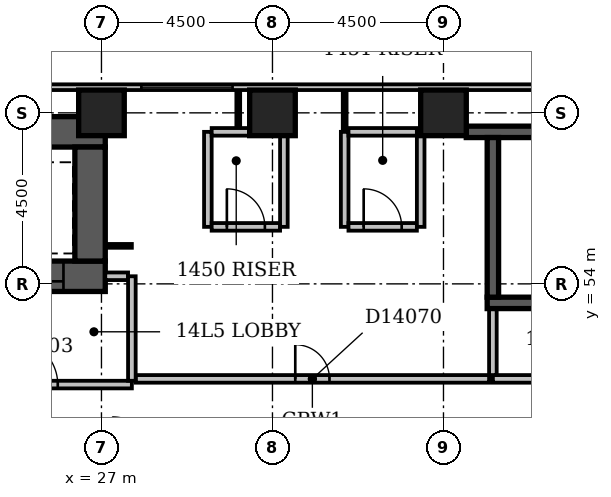
"""IFC4 building model, lengths in metres.
Left out: names, types, materials, properties, quantities, classifications, styles, units other than length and angle.
Written with IfcOpenShell. Run it as: python <this file> out.ifc"""

import sys

from ifc_helpers import new_model, si_unit, direction, frame, frame_2d, origin, origin_2d, place, context, subcontext, project, spatial, rectangle, extrude, element, fill, save


model = new_model("IFC4")
c1 = context("Model", 3, precision=1e-05, world=origin(), true_north=direction((0.0, 1.0)))
c2 = subcontext(c1, "Body", "Model", "MODEL_VIEW")
j1 = project(units=[si_unit("LENGTHUNIT", "METRE"), si_unit("PLANEANGLEUNIT", "RADIAN")], contexts=[c1])
p1 = place(None, origin())
s1 = spatial("IfcSite", under=j1, at=p1, CompositionType="ELEMENT")
p2 = place(p1, origin())
s2 = spatial("IfcBuilding", under=s1, at=p2, CompositionType="ELEMENT")
p3 = place(p2, frame((0.0, 0.0, 61.4)))
s3 = spatial("IfcBuildingStorey", under=s2, at=p3, CompositionType="ELEMENT", Elevation=61.4)
p4 = place(p3, frame((23.8, 54.2, -0.3), z_axis=(0.0, 0.0, 1.0), x_axis=(1.0, 0.0, 0.0)))
e1 = element("IfcWall", 1, at=p4, inside=s3, PredefinedType="SHEAR", context=c2, shape_type="SweptSolid", body=[
    extrude(rectangle(XDim=3.3, YDim=0.8, at=frame_2d((1.65, 0.0))), origin(), (0.0, 0.0, 1.0), 3.6),
])
p5 = place(p4, frame((1.1, 0.0, 0.3)))
e2 = element("IfcOpeningElement", 2, at=p5, cuts=e1, PredefinedType="OPENING", context=c2, shape_type="SweptSolid", body=[
    extrude(rectangle(XDim=1.1, YDim=2.1, at=frame_2d((0.55, 1.05))), frame((0.0, 0.412, 0.0), z_axis=(0.0, -1.0, 0.0), x_axis=(1.0, 0.0, 0.0)), (0.0, 0.0, 1.0), 0.824),
])
p6 = place(p3, frame((23.8, 58.0, -0.3), z_axis=(0.0, 0.0, 1.0), x_axis=(1.0, 0.0, 0.0)))
e3 = element("IfcWall", 3, at=p6, inside=s3, PredefinedType="SHEAR", context=c2, shape_type="SweptSolid", body=[
    extrude(rectangle(XDim=3.3, YDim=0.8, at=frame_2d((1.65, 0.0))), origin(), (0.0, 0.0, 1.0), 3.6),
])
p7 = place(p3, frame((26.7, 54.6, -0.3), z_axis=(0.0, 0.0, 1.0), x_axis=(0.0, 1.0, 0.0)))
e4 = element("IfcWall", 4, at=p7, inside=s3, PredefinedType="SHEAR", context=c2, shape_type="SweptSolid", body=[
    extrude(rectangle(XDim=3.0, YDim=0.8, at=frame_2d((1.5, 0.0))), origin(), (0.0, 0.0, 1.0), 3.6),
])
p8 = place(p3, frame((36.6, 58.0, -0.3), z_axis=(0.0, 0.0, 1.0), x_axis=(1.0, 0.0, 0.0)))
e5 = element("IfcWall", 5, at=p8, inside=s3, PredefinedType="SHEAR", context=c2, shape_type="SweptSolid", body=[
    extrude(rectangle(XDim=7.8, YDim=0.3, at=frame_2d((3.9, 0.0))), origin(), (0.0, 0.0, 1.0), 3.6),
])
p9 = place(p3, frame((37.15, 53.5, -0.3), z_axis=(0.0, 0.0, 1.0), x_axis=(1.0, 0.0, 0.0)))
e6 = element("IfcWall", 6, at=p9, inside=s3, PredefinedType="SHEAR", context=c2, shape_type="SweptSolid", body=[
    extrude(rectangle(XDim=7.0, YDim=0.3, at=frame_2d((3.5, 0.0))), origin(), (0.0, 0.0, 1.0), 3.6),
])
p10 = place(p9, frame((5.58, 0.0, 0.3)))
e7 = element("IfcOpeningElement", 7, at=p10, cuts=e6, PredefinedType="OPENING", context=c2, shape_type="SweptSolid", body=[
    extrude(rectangle(XDim=1.1, YDim=2.1, at=frame_2d((0.55, 1.05))), frame((0.0, 0.162, 0.0), z_axis=(0.0, -1.0, 0.0), x_axis=(1.0, 0.0, 0.0)), (0.0, 0.0, 1.0), 0.324),
])
p11 = place(p3, frame((37.3, 53.65, -0.3), z_axis=(0.0, 0.0, 1.0), x_axis=(0.0, 1.0, 0.0)))
e8 = element("IfcWall", 8, at=p11, inside=s3, PredefinedType="SHEAR", context=c2, shape_type="SweptSolid", body=[
    extrude(rectangle(XDim=4.2, YDim=0.3, at=frame_2d((2.1, 0.0))), origin(), (0.0, 0.0, 1.0), 3.6),
])
for number, where, z_axis, x_axis in (
    (9, (27.0, 58.5, -0.3), (0.0, 0.0, 1.0), (1.0, 0.0, 0.0)),
    (10, (31.5, 58.5, -0.3), (0.0, 0.0, 1.0), (1.0, 0.0, 0.0)),
    (11, (36.0, 58.5, -0.3), (0.0, 0.0, 1.0), (1.0, 0.0, 0.0)),
):
    element("IfcColumn", number, at=place(p3, frame(where, z_axis=z_axis, x_axis=x_axis)), inside=s3, PredefinedType="COLUMN", context=c2, shape_type="SweptSolid", body=[
        extrude(rectangle(XDim=1.2, YDim=1.2, at=origin_2d()), origin(), (0.0, 0.0, 1.0), 3.6),
    ])
p12 = place(p3, frame((68.1, 59.175, 0.0), z_axis=(0.0, 0.0, 1.0), x_axis=(-1.0, 0.0, 0.0)))
e12 = element("IfcWall", 12, at=p12, inside=s3, PredefinedType="STANDARD", context=c2, shape_type="SweptSolid", body=[
    extrude(rectangle(XDim=68.85, YDim=0.15, at=frame_2d((34.425, 0.0))), origin(), (0.0, 0.0, 1.0), 2.7),
])
p13 = place(p12, frame((37.65, 0.0, 0.6)))
e13 = element("IfcOpeningElement", 13, at=p13, cuts=e12, PredefinedType="OPENING", context=c2, shape_type="SweptSolid", body=[
    extrude(rectangle(XDim=2.4, YDim=1.8, at=frame_2d((1.2, 0.9))), frame((0.0, 0.087, 0.0), z_axis=(0.0, -1.0, 0.0), x_axis=(1.0, 0.0, 0.0)), (0.0, 0.0, 1.0), 0.174),
])
p14 = place(p3, frame((23.0, 51.35, 0.0), z_axis=(0.0, 0.0, 1.0), x_axis=(1.0, 0.0, 0.0)))
e14 = element("IfcWall", 14, at=p14, inside=s3, PredefinedType="PARTITIONING", context=c2, shape_type="SweptSolid", body=[
    extrude(rectangle(XDim=4.8, YDim=0.2, at=frame_2d((2.4, 0.0))), origin(), (0.0, 0.0, 1.0), 3.3),
])
p15 = place(p14, frame((1.65, 0.0, 0.0)))
e15 = element("IfcOpeningElement", 15, at=p15, cuts=e14, PredefinedType="OPENING", context=c2, shape_type="SweptSolid", body=[
    extrude(rectangle(XDim=1.2, YDim=2.1, at=frame_2d((0.6, 1.05))), frame((0.0, 0.112, 0.0), z_axis=(0.0, -1.0, 0.0), x_axis=(1.0, 0.0, 0.0)), (0.0, 0.0, 1.0), 0.224),
])
p16 = place(p3, frame((27.8, 51.45, 0.0), z_axis=(0.0, 0.0, 1.0), x_axis=(0.0, 1.0, 0.0)))
e16 = element("IfcWall", 16, at=p16, inside=s3, PredefinedType="PARTITIONING", context=c2, shape_type="SweptSolid", body=[
    extrude(rectangle(XDim=2.75, YDim=0.2, at=frame_2d((1.375, 0.0))), origin(), (0.0, 0.0, 1.0), 3.3),
])
p17 = place(p3, frame((27.1, 54.2, 0.0), z_axis=(0.0, 0.0, 1.0), x_axis=(1.0, 0.0, 0.0)))
e17 = element("IfcWall", 17, at=p17, inside=s3, PredefinedType="PARTITIONING", context=c2, shape_type="SweptSolid", body=[
    extrude(rectangle(XDim=0.6, YDim=0.2, at=frame_2d((0.3, 0.0))), origin(), (0.0, 0.0, 1.0), 3.3),
])
p18 = place(p3, frame((37.3, 51.5, 0.0), z_axis=(0.0, 0.0, 1.0), x_axis=(1.0, 0.0, 0.0)))
e18 = element("IfcWall", 18, at=p18, inside=s3, PredefinedType="PARTITIONING", context=c2, shape_type="SweptSolid", body=[
    extrude(rectangle(XDim=6.7, YDim=0.2, at=frame_2d((3.35, 0.0))), origin(), (0.0, 0.0, 1.0), 3.3),
])
p19 = place(p18, frame((2.75, 0.0, 0.0)))
e19 = element("IfcOpeningElement", 19, at=p19, cuts=e18, PredefinedType="OPENING", context=c2, shape_type="SweptSolid", body=[
    extrude(rectangle(XDim=1.2, YDim=2.1, at=frame_2d((0.6, 1.05))), frame((0.0, 0.112, 0.0), z_axis=(0.0, -1.0, 0.0), x_axis=(1.0, 0.0, 0.0)), (0.0, 0.0, 1.0), 0.224),
])
p20 = place(p3, frame((37.3, 51.6, 0.0), z_axis=(0.0, 0.0, 1.0), x_axis=(0.0, 1.0, 0.0)))
e20 = element("IfcWall", 20, at=p20, inside=s3, PredefinedType="PARTITIONING", context=c2, shape_type="SweptSolid", body=[
    extrude(rectangle(XDim=1.73, YDim=0.2, at=frame_2d((0.865, 0.0))), origin(), (0.0, 0.0, 1.0), 3.3),
])
p21 = place(p3, frame((27.9, 51.5, 0.0), z_axis=(0.0, 0.0, 1.0), x_axis=(1.0, 0.0, 0.0)))
e21 = element("IfcWall", 21, at=p21, inside=s3, PredefinedType="PARTITIONING", context=c2, shape_type="SweptSolid", body=[
    extrude(rectangle(XDim=9.3, YDim=0.2, at=frame_2d((4.65, 0.0))), origin(), (0.0, 0.0, 1.0), 3.3),
])
p22 = place(p21, frame((4.2, 0.0, 0.0)))
e22 = element("IfcOpeningElement", 22, at=p22, cuts=e21, PredefinedType="OPENING", context=c2, shape_type="SweptSolid", body=[
    extrude(rectangle(XDim=0.9, YDim=2.1, at=frame_2d((0.45, 1.05))), frame((0.0, 0.112, 0.0), z_axis=(0.0, -1.0, 0.0), x_axis=(1.0, 0.0, 0.0)), (0.0, 0.0, 1.0), 0.224),
])
p23 = place(p3, frame((27.1, 55.0, 0.0), z_axis=(0.0, 0.0, 1.0), x_axis=(1.0, 0.0, 0.0)))
e23 = element("IfcWall", 23, at=p23, inside=s3, PredefinedType="PARTITIONING", context=c2, shape_type="SweptSolid", body=[
    extrude(rectangle(XDim=0.7, YDim=0.1, at=frame_2d((0.35, 0.0))), origin(), (0.0, 0.0, 1.0), 3.3),
])
p24 = place(p3, frame((29.8, 55.5, 0.0), z_axis=(0.0, 0.0, 1.0), x_axis=(0.0, 1.0, 0.0)))
e24 = element("IfcWall", 24, at=p24, inside=s3, PredefinedType="PARTITIONING", context=c2, shape_type="SweptSolid", body=[
    extrude(rectangle(XDim=2.5, YDim=0.2, at=frame_2d((1.25, 0.0))), origin(), (0.0, 0.0, 1.0), 3.3),
])
p25 = place(p3, frame((29.9, 55.5, 0.0), z_axis=(0.0, 0.0, 1.0), x_axis=(1.0, 0.0, 0.0)))
e25 = element("IfcWall", 25, at=p25, inside=s3, PredefinedType="PARTITIONING", context=c2, shape_type="SweptSolid", body=[
    extrude(rectangle(XDim=1.8, YDim=0.2, at=frame_2d((0.9, 0.0))), origin(), (0.0, 0.0, 1.0), 3.3),
])
p26 = place(p25, frame((0.4, 0.0, 0.0)))
e26 = element("IfcOpeningElement", 26, at=p26, cuts=e25, PredefinedType="OPENING", context=c2, shape_type="SweptSolid", body=[
    extrude(rectangle(XDim=1.0, YDim=2.1, at=frame_2d((0.5, 1.05))), frame((0.0, 0.112, 0.0), z_axis=(0.0, -1.0, 0.0), x_axis=(1.0, 0.0, 0.0)), (0.0, 0.0, 1.0), 0.224),
])
for number, where, z_axis, x_axis in (
    (27, (31.8, 55.5, 0.0), (0.0, 0.0, 1.0), (0.0, 1.0, 0.0)),
    (28, (33.4, 55.5, 0.0), (0.0, 0.0, 1.0), (0.0, 1.0, 0.0)),
):
    element("IfcWall", number, at=place(p3, frame(where, z_axis=z_axis, x_axis=x_axis)), inside=s3, PredefinedType="PARTITIONING", context=c2, shape_type="SweptSolid", body=[
        extrude(rectangle(XDim=2.5, YDim=0.2, at=frame_2d((1.25, 0.0))), origin(), (0.0, 0.0, 1.0), 3.3),
    ])
p27 = place(p3, frame((33.5, 55.5, 0.0), z_axis=(0.0, 0.0, 1.0), x_axis=(1.0, 0.0, 0.0)))
e29 = element("IfcWall", 29, at=p27, inside=s3, PredefinedType="PARTITIONING", context=c2, shape_type="SweptSolid", body=[
    extrude(rectangle(XDim=1.8, YDim=0.2, at=frame_2d((0.9, 0.0))), origin(), (0.0, 0.0, 1.0), 3.3),
])
p28 = place(p27, frame((0.4, 0.0, 0.0)))
e30 = element("IfcOpeningElement", 30, at=p28, cuts=e29, PredefinedType="OPENING", context=c2, shape_type="SweptSolid", body=[
    extrude(rectangle(XDim=1.0, YDim=2.1, at=frame_2d((0.5, 1.05))), frame((0.0, 0.112, 0.0), z_axis=(0.0, -1.0, 0.0), x_axis=(1.0, 0.0, 0.0)), (0.0, 0.0, 1.0), 0.224),
])
p29 = place(p3, frame((35.4, 55.5, 0.0), z_axis=(0.0, 0.0, 1.0), x_axis=(0.0, 1.0, 0.0)))
e31 = element("IfcWall", 31, at=p29, inside=s3, PredefinedType="PARTITIONING", context=c2, shape_type="SweptSolid", body=[
    extrude(rectangle(XDim=2.5, YDim=0.2, at=frame_2d((1.25, 0.0))), origin(), (0.0, 0.0, 1.0), 2.4),
])
p30 = place(p3, frame((29.9, 58.0, 0.0), z_axis=(0.0, 0.0, 1.0), x_axis=(1.0, 0.0, 0.0)))
e32 = element("IfcWall", 32, at=p30, inside=s3, PredefinedType="PARTITIONING", context=c2, shape_type="SweptSolid", body=[
    extrude(rectangle(XDim=1.8, YDim=0.2, at=frame_2d((0.9, 0.0))), origin(), (0.0, 0.0, 1.0), 3.3),
])
p31 = place(p3, frame((33.4, 58.0, 0.0), z_axis=(0.0, 0.0, 1.0), x_axis=(0.0, 1.0, 0.0)))
e33 = element("IfcWall", 33, at=p31, inside=s3, PredefinedType="PARTITIONING", context=c2, shape_type="SweptSolid", body=[
    extrude(rectangle(XDim=1.1, YDim=0.1, at=frame_2d((0.55, 0.0))), origin(), (0.0, 0.0, 1.0), 3.3),
])
p32 = place(p3, frame((33.5, 58.0, 0.0), z_axis=(0.0, 0.0, 1.0), x_axis=(1.0, 0.0, 0.0)))
e34 = element("IfcWall", 34, at=p32, inside=s3, PredefinedType="PARTITIONING", context=c2, shape_type="SweptSolid", body=[
    extrude(rectangle(XDim=1.8, YDim=0.2, at=frame_2d((0.9, 0.0))), origin(), (0.0, 0.0, 1.0), 3.3),
])
p33 = place(p3, frame((30.6, 58.1, 0.0), z_axis=(0.0, 0.0, 1.0), x_axis=(0.0, 1.0, 0.0)))
e35 = element("IfcWall", 35, at=p33, inside=s3, PredefinedType="PARTITIONING", context=c2, shape_type="SweptSolid", body=[
    extrude(rectangle(XDim=1.0, YDim=0.1, at=frame_2d((0.5, 0.0))), origin(), (0.0, 0.0, 1.0), 3.3),
])
p34 = place(p13, origin())
e36 = element("IfcWindow", 36, at=p34, inside=s3, PartitioningType="SINGLE_PANEL", PredefinedType="WINDOW", context=c2, shape_type="SweptSolid", body=[
    extrude(rectangle(XDim=2.4, YDim=1.8, at=frame_2d((1.2, 0.9))), frame((0.0, 0.03, 0.0), z_axis=(0.0, -1.0, 0.0), x_axis=(1.0, 0.0, 0.0)), (0.0, 0.0, 1.0), 0.06),
])
fill(e13, e36)
p35 = place(p15, origin())
e37 = element("IfcDoor", 37, at=p35, inside=s3, OperationType="SINGLE_SWING_LEFT", PredefinedType="DOOR", context=c2, shape_type="SweptSolid", body=[
    extrude(rectangle(XDim=1.2, YDim=2.1, at=frame_2d((0.6, 1.05))), frame((0.0, 0.025, 0.0), z_axis=(0.0, -1.0, 0.0), x_axis=(1.0, 0.0, 0.0)), (0.0, 0.0, 1.0), 0.05),
])
fill(e15, e37)
p36 = place(p5, origin())
e38 = element("IfcDoor", 38, at=p36, inside=s3, OperationType="SLIDING_TO_LEFT", PredefinedType="DOOR", context=c2, shape_type="SweptSolid", body=[
    extrude(rectangle(XDim=1.1, YDim=2.1, at=frame_2d((0.55, 1.05))), frame((0.0, 0.025, 0.0), z_axis=(0.0, -1.0, 0.0), x_axis=(1.0, 0.0, 0.0)), (0.0, 0.0, 1.0), 0.05),
])
fill(e2, e38)
p37 = place(p22, origin())
e39 = element("IfcDoor", 39, at=p37, inside=s3, OperationType="SINGLE_SWING_LEFT", PredefinedType="DOOR", context=c2, shape_type="SweptSolid", body=[
    extrude(rectangle(XDim=0.9, YDim=2.1, at=frame_2d((0.45, 1.05))), frame((0.0, 0.025, 0.0), z_axis=(0.0, -1.0, 0.0), x_axis=(1.0, 0.0, 0.0)), (0.0, 0.0, 1.0), 0.05),
])
fill(e22, e39)
p38 = place(p26, origin())
e40 = element("IfcDoor", 40, at=p38, inside=s3, OperationType="SINGLE_SWING_LEFT", PredefinedType="DOOR", context=c2, shape_type="SweptSolid", body=[
    extrude(rectangle(XDim=1.0, YDim=2.1, at=frame_2d((0.5, 1.05))), frame((0.0, 0.025, 0.0), z_axis=(0.0, -1.0, 0.0), x_axis=(1.0, 0.0, 0.0)), (0.0, 0.0, 1.0), 0.05),
])
fill(e26, e40)
p39 = place(p28, origin())
e41 = element("IfcDoor", 41, at=p39, inside=s3, OperationType="SINGLE_SWING_LEFT", PredefinedType="DOOR", context=c2, shape_type="SweptSolid", body=[
    extrude(rectangle(XDim=1.0, YDim=2.1, at=frame_2d((0.5, 1.05))), frame((0.0, 0.025, 0.0), z_axis=(0.0, -1.0, 0.0), x_axis=(1.0, 0.0, 0.0)), (0.0, 0.0, 1.0), 0.05),
])
fill(e30, e41)
save(model, sys.argv[1])
